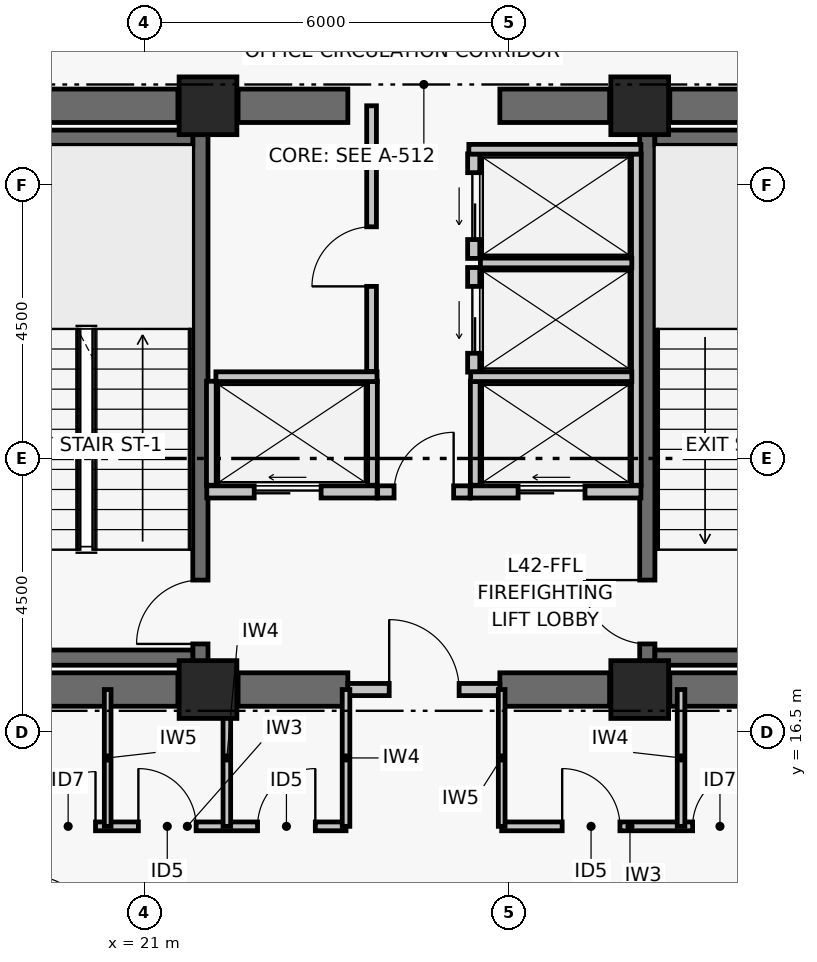
"""IFC4 building model, lengths in metres.
Left out: names, types, materials, properties, quantities, classifications, styles, units other than length and angle.
Written with IfcOpenShell. Run it as: python <this file> out.ifc"""

import sys

from ifc_helpers import new_model, si_unit, direction, frame, frame_2d, origin, origin_2d, place, context, subcontext, project, spatial, rectangle, extrude, element, fill, save


model = new_model("IFC4")
c1 = context("Model", 3, precision=1e-05, world=origin(), true_north=direction((0.0, 1.0)))
c2 = subcontext(c1, "Body", "Model", "MODEL_VIEW")
j1 = project(units=[si_unit("LENGTHUNIT", "METRE"), si_unit("PLANEANGLEUNIT", "RADIAN")], contexts=[c1])
p1 = place(None, origin())
s1 = spatial("IfcSite", under=j1, at=p1, CompositionType="ELEMENT")
p2 = place(p1, origin())
s2 = spatial("IfcBuilding", under=s1, at=p2, CompositionType="ELEMENT")
p3 = place(p2, frame((0.0, 0.0, 169.2)))
s3 = spatial("IfcBuildingStorey", under=s2, at=p3, CompositionType="ELEMENT", Elevation=169.2)
for number, where, z_axis, x_axis in (
    (1, (22.05, 17.2, 0.0), (0.0, 0.0, 1.0), (1.0, 0.0, 0.0)),
    (2, (29.15, 17.2, 0.0), (0.0, 0.0, 1.0), (1.0, 0.0, 0.0)),
    (3, (22.05, 26.8, 0.0), (0.0, 0.0, 1.0), (1.0, 0.0, 0.0)),
    (4, (29.15, 26.8, 0.0), (0.0, 0.0, 1.0), (1.0, 0.0, 0.0)),
):
    element("IfcColumn", number, at=place(p3, frame(where, z_axis=z_axis, x_axis=x_axis)), inside=s3, PredefinedType="COLUMN", context=c2, shape_type="SweptSolid", body=[
        extrude(rectangle(XDim=0.95, YDim=0.95, at=origin_2d()), origin(), (0.0, 0.0, 1.0), 3.72),
    ])
p4 = place(p3, frame((18.295, 17.2, 0.0), z_axis=(0.0, 0.0, 1.0), x_axis=(1.0, 0.0, 0.0)))
e5 = element("IfcWall", 5, at=p4, inside=s3, PredefinedType="SHEAR", context=c2, shape_type="SweptSolid", body=[
    extrude(rectangle(XDim=3.26, YDim=0.55, at=frame_2d((1.63, 0.0))), origin(), (0.0, 0.0, 1.0), 3.44),
])
p5 = place(p3, frame((22.545, 17.2, 0.0), z_axis=(0.0, 0.0, 1.0), x_axis=(1.0, 0.0, 0.0)))
e6 = element("IfcWall", 6, at=p5, inside=s3, PredefinedType="SHEAR", context=c2, shape_type="SweptSolid", body=[
    extrude(rectangle(XDim=1.805, YDim=0.55, at=frame_2d((0.903, 0.0))), origin(), (0.0, 0.0, 1.0), 3.44),
])
p6 = place(p3, frame((26.85, 17.2, 0.0), z_axis=(0.0, 0.0, 1.0), x_axis=(1.0, 0.0, 0.0)))
e7 = element("IfcWall", 7, at=p6, inside=s3, PredefinedType="SHEAR", context=c2, shape_type="SweptSolid", body=[
    extrude(rectangle(XDim=1.805, YDim=0.55, at=frame_2d((0.902, 0.0))), origin(), (0.0, 0.0, 1.0), 3.44),
])
for number, where, z_axis, x_axis in (
    (8, (29.645, 17.2, 0.0), (0.0, 0.0, 1.0), (1.0, 0.0, 0.0)),
    (9, (18.295, 26.8, 0.0), (0.0, 0.0, 1.0), (1.0, 0.0, 0.0)),
):
    element("IfcWall", number, at=place(p3, frame(where, z_axis=z_axis, x_axis=x_axis)), inside=s3, PredefinedType="SHEAR", context=c2, shape_type="SweptSolid", body=[
        extrude(rectangle(XDim=3.26, YDim=0.55, at=frame_2d((1.63, 0.0))), origin(), (0.0, 0.0, 1.0), 3.44),
    ])
p7 = place(p3, frame((22.545, 26.8, 0.0), z_axis=(0.0, 0.0, 1.0), x_axis=(1.0, 0.0, 0.0)))
e10 = element("IfcWall", 10, at=p7, inside=s3, PredefinedType="SHEAR", context=c2, shape_type="SweptSolid", body=[
    extrude(rectangle(XDim=1.805, YDim=0.55, at=frame_2d((0.903, 0.0))), origin(), (0.0, 0.0, 1.0), 3.44),
])
p8 = place(p3, frame((26.85, 26.8, 0.0), z_axis=(0.0, 0.0, 1.0), x_axis=(1.0, 0.0, 0.0)))
e11 = element("IfcWall", 11, at=p8, inside=s3, PredefinedType="SHEAR", context=c2, shape_type="SweptSolid", body=[
    extrude(rectangle(XDim=1.805, YDim=0.55, at=frame_2d((0.902, 0.0))), origin(), (0.0, 0.0, 1.0), 3.44),
])
p9 = place(p3, frame((29.645, 26.8, 0.0), z_axis=(0.0, 0.0, 1.0), x_axis=(1.0, 0.0, 0.0)))
e12 = element("IfcWall", 12, at=p9, inside=s3, PredefinedType="SHEAR", context=c2, shape_type="SweptSolid", body=[
    extrude(rectangle(XDim=3.26, YDim=0.55, at=frame_2d((1.63, 0.0))), origin(), (0.0, 0.0, 1.0), 3.44),
])
p10 = place(p3, frame((21.925, 17.6, 0.0), z_axis=(0.0, 0.0, 1.0), x_axis=(0.0, 1.0, 0.0)))
e13 = element("IfcWall", 13, at=p10, inside=s3, PredefinedType="SHEAR", context=c2, shape_type="SweptSolid", body=[
    extrude(rectangle(XDim=8.8, YDim=0.25, at=frame_2d((4.4, 0.0))), origin(), (0.0, 0.0, 1.0), 3.44),
])
p11 = place(p10, frame((0.35, 0.0, 0.0)))
e14 = element("IfcOpeningElement", 14, at=p11, cuts=e13, PredefinedType="OPENING", context=c2, shape_type="SweptSolid", body=[
    extrude(rectangle(XDim=1.05, YDim=2.08, at=frame_2d((0.525, 1.04))), frame((0.0, 0.135, 0.0), z_axis=(0.0, -1.0, 0.0), x_axis=(1.0, 0.0, 0.0)), (0.0, 0.0, 1.0), 0.27),
])
for number, where, z_axis, x_axis in (
    (15, (18.329, 17.725, 0.0), (0.0, 0.0, 1.0), (1.0, 0.0, 0.0)),
    (16, (18.329, 26.275, 0.0), (0.0, 0.0, 1.0), (1.0, 0.0, 0.0)),
):
    element("IfcWall", number, at=place(p3, frame(where, z_axis=z_axis, x_axis=x_axis)), inside=s3, PredefinedType="SHEAR", context=c2, shape_type="SweptSolid", body=[
        extrude(rectangle(XDim=3.471, YDim=0.25, at=frame_2d((1.735, 0.0))), origin(), (0.0, 0.0, 1.0), 3.44),
    ])
p12 = place(p3, frame((29.275, 17.6, 0.0), z_axis=(0.0, 0.0, 1.0), x_axis=(0.0, 1.0, 0.0)))
e17 = element("IfcWall", 17, at=p12, inside=s3, PredefinedType="SHEAR", context=c2, shape_type="SweptSolid", body=[
    extrude(rectangle(XDim=8.8, YDim=0.25, at=frame_2d((4.4, 0.0))), origin(), (0.0, 0.0, 1.0), 3.44),
])
p13 = place(p12, frame((0.35, 0.0, 0.0)))
e18 = element("IfcOpeningElement", 18, at=p13, cuts=e17, PredefinedType="OPENING", context=c2, shape_type="SweptSolid", body=[
    extrude(rectangle(XDim=1.05, YDim=2.08, at=frame_2d((0.525, 1.04))), frame((0.0, 0.135, 0.0), z_axis=(0.0, -1.0, 0.0), x_axis=(1.0, 0.0, 0.0)), (0.0, 0.0, 1.0), 0.27),
])
for number, where, z_axis, x_axis in (
    (19, (29.4, 17.725, 0.0), (0.0, 0.0, 1.0), (1.0, 0.0, 0.0)),
    (20, (29.4, 26.275, 0.0), (0.0, 0.0, 1.0), (1.0, 0.0, 0.0)),
):
    element("IfcWall", number, at=place(p3, frame(where, z_axis=z_axis, x_axis=x_axis)), inside=s3, PredefinedType="SHEAR", context=c2, shape_type="SweptSolid", body=[
        extrude(rectangle(XDim=3.471, YDim=0.25, at=frame_2d((1.736, 0.0))), origin(), (0.0, 0.0, 1.0), 3.44),
    ])
p14 = place(p3, frame((24.35, 17.2, 0.0), z_axis=(0.0, 0.0, 1.0), x_axis=(1.0, 0.0, 0.0)))
e21 = element("IfcWall", 21, at=p14, inside=s3, PredefinedType="PARTITIONING", context=c2, shape_type="SweptSolid", body=[
    extrude(rectangle(XDim=2.5, YDim=0.2, at=frame_2d((1.25, 0.0))), origin(), (0.0, 0.0, 1.0), 2.57),
])
p15 = place(p14, frame((0.68, 0.0, 0.0)))
e22 = element("IfcOpeningElement", 22, at=p15, cuts=e21, PredefinedType="OPENING", context=c2, shape_type="SweptSolid", body=[
    extrude(rectangle(XDim=1.15, YDim=2.08, at=frame_2d((0.575, 1.04))), frame((0.0, 0.11, 0.0), z_axis=(0.0, -1.0, 0.0), x_axis=(1.0, 0.0, 0.0)), (0.0, 0.0, 1.0), 0.22),
])
p16 = place(p3, frame((24.84, 20.45, 0.0), z_axis=(0.0, 0.0, 1.0), x_axis=(1.0, 0.0, 0.0)))
e23 = element("IfcWall", 23, at=p16, inside=s3, PredefinedType="PARTITIONING", context=c2, shape_type="SweptSolid", body=[
    extrude(rectangle(XDim=1.52, YDim=0.2, at=frame_2d((0.76, 0.0))), origin(), (0.0, 0.0, 1.0), 3.44),
])
p17 = place(p16, frame((0.27, 0.0, 0.0)))
e24 = element("IfcOpeningElement", 24, at=p17, cuts=e23, PredefinedType="OPENING", context=c2, shape_type="SweptSolid", body=[
    extrude(rectangle(XDim=0.98, YDim=2.06, at=frame_2d((0.49, 1.03))), frame((0.0, 0.11, 0.0), z_axis=(0.0, -1.0, 0.0), x_axis=(1.0, 0.0, 0.0)), (0.0, 0.0, 1.0), 0.22),
])
p18 = place(p3, frame((22.03, 20.45, 0.0), z_axis=(0.0, 0.0, 1.0), x_axis=(1.0, 0.0, 0.0)))
e25 = element("IfcWall", 25, at=p18, inside=s3, PredefinedType="PARTITIONING", context=c2, shape_type="SweptSolid", body=[
    extrude(rectangle(XDim=2.8, YDim=0.2, at=frame_2d((1.4, 0.0))), origin(), (0.0, 0.0, 1.0), 3.44),
])
p19 = place(p18, frame((0.78, 0.0, 0.0)))
e26 = element("IfcOpeningElement", 26, at=p19, cuts=e25, PredefinedType="OPENING", context=c2, shape_type="SweptSolid", body=[
    extrude(rectangle(XDim=1.1, YDim=2.08, at=frame_2d((0.55, 1.04))), frame((0.0, 0.11, 0.0), z_axis=(0.0, -1.0, 0.0), x_axis=(1.0, 0.0, 0.0)), (0.0, 0.0, 1.0), 0.22),
])
p20 = place(p3, frame((26.37, 20.45, 0.0), z_axis=(0.0, 0.0, 1.0), x_axis=(1.0, 0.0, 0.0)))
e27 = element("IfcWall", 27, at=p20, inside=s3, PredefinedType="PARTITIONING", context=c2, shape_type="SweptSolid", body=[
    extrude(rectangle(XDim=2.8, YDim=0.2, at=frame_2d((1.4, 0.0))), origin(), (0.0, 0.0, 1.0), 3.44),
])
p21 = place(p20, frame((0.78, 0.0, 0.0)))
e28 = element("IfcOpeningElement", 28, at=p21, cuts=e27, PredefinedType="OPENING", context=c2, shape_type="SweptSolid", body=[
    extrude(rectangle(XDim=1.1, YDim=2.08, at=frame_2d((0.55, 1.04))), frame((0.0, 0.11, 0.0), z_axis=(0.0, -1.0, 0.0), x_axis=(1.0, 0.0, 0.0)), (0.0, 0.0, 1.0), 0.22),
])
p22 = place(p3, frame((26.42, 22.42, 0.0), z_axis=(0.0, 0.0, 1.0), x_axis=(0.0, 1.0, 0.0)))
e29 = element("IfcWall", 29, at=p22, inside=s3, PredefinedType="PARTITIONING", context=c2, shape_type="SweptSolid", body=[
    extrude(rectangle(XDim=1.72, YDim=0.2, at=frame_2d((0.86, 0.0))), origin(), (0.0, 0.0, 1.0), 3.44),
])
p23 = place(p22, frame((0.31, 0.0, 0.0)))
e30 = element("IfcOpeningElement", 30, at=p23, cuts=e29, PredefinedType="OPENING", context=c2, shape_type="SweptSolid", body=[
    extrude(rectangle(XDim=1.1, YDim=2.08, at=frame_2d((0.55, 1.04))), frame((0.0, 0.11, 0.0), z_axis=(0.0, -1.0, 0.0), x_axis=(1.0, 0.0, 0.0)), (0.0, 0.0, 1.0), 0.22),
])
p24 = place(p3, frame((26.42, 24.29, 0.0), z_axis=(0.0, 0.0, 1.0), x_axis=(0.0, 1.0, 0.0)))
e31 = element("IfcWall", 31, at=p24, inside=s3, PredefinedType="PARTITIONING", context=c2, shape_type="SweptSolid", body=[
    extrude(rectangle(XDim=1.72, YDim=0.2, at=frame_2d((0.86, 0.0))), origin(), (0.0, 0.0, 1.0), 3.44),
])
p25 = place(p24, frame((0.31, 0.0, 0.0)))
e32 = element("IfcOpeningElement", 32, at=p25, cuts=e31, PredefinedType="OPENING", context=c2, shape_type="SweptSolid", body=[
    extrude(rectangle(XDim=1.1, YDim=2.08, at=frame_2d((0.55, 1.04))), frame((0.0, 0.11, 0.0), z_axis=(0.0, -1.0, 0.0), x_axis=(1.0, 0.0, 0.0)), (0.0, 0.0, 1.0), 0.22),
])
for number, where, z_axis, x_axis in (
    (33, (22.105, 20.56, 0.0), (0.0, 0.0, 1.0), (0.0, 1.0, 0.0)),
    (34, (24.755, 20.56, 0.0), (0.0, 0.0, 1.0), (0.0, 1.0, 0.0)),
):
    element("IfcWall", number, at=place(p3, frame(where, z_axis=z_axis, x_axis=x_axis)), inside=s3, PredefinedType="PARTITIONING", context=c2, shape_type="SweptSolid", body=[
        extrude(rectangle(XDim=1.71, YDim=0.16, at=frame_2d((0.855, 0.0))), origin(), (0.0, 0.0, 1.0), 3.44),
    ])
p26 = place(p3, frame((22.18, 22.345, 0.0), z_axis=(0.0, 0.0, 1.0), x_axis=(1.0, 0.0, 0.0)))
e35 = element("IfcWall", 35, at=p26, inside=s3, PredefinedType="PARTITIONING", context=c2, shape_type="SweptSolid", body=[
    extrude(rectangle(XDim=2.65, YDim=0.16, at=frame_2d((1.325, 0.0))), origin(), (0.0, 0.0, 1.0), 3.44),
])
p27 = place(p3, frame((29.095, 20.56, 0.0), z_axis=(0.0, 0.0, 1.0), x_axis=(0.0, 1.0, 0.0)))
e36 = element("IfcWall", 36, at=p27, inside=s3, PredefinedType="PARTITIONING", context=c2, shape_type="SweptSolid", body=[
    extrude(rectangle(XDim=5.45, YDim=0.16, at=frame_2d((2.725, 0.0))), origin(), (0.0, 0.0, 1.0), 3.44),
])
p28 = place(p3, frame((26.445, 20.56, 0.0), z_axis=(0.0, 0.0, 1.0), x_axis=(0.0, 1.0, 0.0)))
e37 = element("IfcWall", 37, at=p28, inside=s3, PredefinedType="PARTITIONING", context=c2, shape_type="SweptSolid", body=[
    extrude(rectangle(XDim=1.71, YDim=0.16, at=frame_2d((0.855, 0.0))), origin(), (0.0, 0.0, 1.0), 3.44),
])
p29 = place(p3, frame((26.37, 22.345, 0.0), z_axis=(0.0, 0.0, 1.0), x_axis=(1.0, 0.0, 0.0)))
e38 = element("IfcWall", 38, at=p29, inside=s3, PredefinedType="PARTITIONING", context=c2, shape_type="SweptSolid", body=[
    extrude(rectangle(XDim=2.65, YDim=0.16, at=frame_2d((1.325, 0.0))), origin(), (0.0, 0.0, 1.0), 3.44),
])
p30 = place(p3, frame((26.53, 24.215, 0.0), z_axis=(0.0, 0.0, 1.0), x_axis=(1.0, 0.0, 0.0)))
e39 = element("IfcWall", 39, at=p30, inside=s3, PredefinedType="PARTITIONING", context=c2, shape_type="SweptSolid", body=[
    extrude(rectangle(XDim=2.49, YDim=0.16, at=frame_2d((1.245, 0.0))), origin(), (0.0, 0.0, 1.0), 3.44),
])
p31 = place(p3, frame((26.34, 26.085, 0.0), z_axis=(0.0, 0.0, 1.0), x_axis=(1.0, 0.0, 0.0)))
e40 = element("IfcWall", 40, at=p31, inside=s3, PredefinedType="PARTITIONING", context=c2, shape_type="SweptSolid", body=[
    extrude(rectangle(XDim=2.83, YDim=0.16, at=frame_2d((1.415, 0.0))), origin(), (0.0, 0.0, 1.0), 3.44),
])
p32 = place(p3, frame((24.74, 22.43, 0.0), z_axis=(0.0, 0.0, 1.0), x_axis=(0.0, 1.0, 0.0)))
e41 = element("IfcWall", 41, at=p32, inside=s3, PredefinedType="PARTITIONING", context=c2, shape_type="SweptSolid", body=[
    extrude(rectangle(XDim=4.37, YDim=0.16, at=frame_2d((2.185, 0.0))), origin(), (0.0, 0.0, 1.0), 2.57),
])
p33 = place(p32, frame((1.4, 0.0, 0.0)))
e42 = element("IfcOpeningElement", 42, at=p33, cuts=e41, PredefinedType="OPENING", context=c2, shape_type="SweptSolid", body=[
    extrude(rectangle(XDim=0.98, YDim=2.06, at=frame_2d((0.49, 1.03))), frame((0.0, 0.09, 0.0), z_axis=(0.0, -1.0, 0.0), x_axis=(1.0, 0.0, 0.0)), (0.0, 0.0, 1.0), 0.18),
])
p34 = place(p3, frame((19.1, 14.95, 0.0), z_axis=(0.0, 0.0, 1.0), x_axis=(1.0, 0.0, 0.0)))
e43 = element("IfcWall", 43, at=p34, inside=s3, PredefinedType="PARTITIONING", context=c2, shape_type="SweptSolid", body=[
    extrude(rectangle(XDim=5.22, YDim=0.145, at=frame_2d((2.61, 0.0))), origin(), (0.0, 0.0, 1.0), 2.17),
])
p35 = place(p34, frame((0.2, 0.0, 0.0)))
e44 = element("IfcOpeningElement", 44, at=p35, cuts=e43, PredefinedType="OPENING", context=c2, shape_type="SweptSolid", body=[
    extrude(rectangle(XDim=0.9, YDim=2.02, at=frame_2d((0.45, 1.01))), frame((0.0, 0.083, 0.0), z_axis=(0.0, -1.0, 0.0), x_axis=(1.0, 0.0, 0.0)), (0.0, 0.0, 1.0), 0.165),
])
p36 = place(p34, frame((1.805, 0.0, 0.0)))
e45 = element("IfcOpeningElement", 45, at=p36, cuts=e43, PredefinedType="OPENING", context=c2, shape_type="SweptSolid", body=[
    extrude(rectangle(XDim=0.95, YDim=2.06, at=frame_2d((0.475, 1.03))), frame((0.0, 0.083, 0.0), z_axis=(0.0, -1.0, 0.0), x_axis=(1.0, 0.0, 0.0)), (0.0, 0.0, 1.0), 0.165),
])
p37 = place(p34, frame((3.765, 0.0, 0.0)))
e46 = element("IfcOpeningElement", 46, at=p37, cuts=e43, PredefinedType="OPENING", context=c2, shape_type="SweptSolid", body=[
    extrude(rectangle(XDim=0.95, YDim=2.06, at=frame_2d((0.475, 1.03))), frame((0.0, 0.083, 0.0), z_axis=(0.0, -1.0, 0.0), x_axis=(1.0, 0.0, 0.0)), (0.0, 0.0, 1.0), 0.165),
])
p38 = place(p3, frame((26.88, 14.95, 0.0), z_axis=(0.0, 0.0, 1.0), x_axis=(1.0, 0.0, 0.0)))
e47 = element("IfcWall", 47, at=p38, inside=s3, PredefinedType="PARTITIONING", context=c2, shape_type="SweptSolid", body=[
    extrude(rectangle(XDim=4.22, YDim=0.145, at=frame_2d((2.11, 0.0))), origin(), (0.0, 0.0, 1.0), 2.87),
])
p39 = place(p38, frame((0.995, 0.0, 0.0)))
e48 = element("IfcOpeningElement", 48, at=p39, cuts=e47, PredefinedType="OPENING", context=c2, shape_type="SweptSolid", body=[
    extrude(rectangle(XDim=0.95, YDim=2.06, at=frame_2d((0.475, 1.03))), frame((0.0, 0.083, 0.0), z_axis=(0.0, -1.0, 0.0), x_axis=(1.0, 0.0, 0.0)), (0.0, 0.0, 1.0), 0.165),
])
p40 = place(p38, frame((3.14, 0.0, 0.0)))
e49 = element("IfcOpeningElement", 49, at=p40, cuts=e47, PredefinedType="OPENING", context=c2, shape_type="SweptSolid", body=[
    extrude(rectangle(XDim=0.9, YDim=2.02, at=frame_2d((0.45, 1.01))), frame((0.0, 0.083, 0.0), z_axis=(0.0, -1.0, 0.0), x_axis=(1.0, 0.0, 0.0)), (0.0, 0.0, 1.0), 0.165),
])
p41 = place(p3, frame((20.4, 14.95, 0.0), z_axis=(0.0, 0.0, 1.0), x_axis=(0.0, 1.0, 0.0)))
e50 = element("IfcWall", 50, at=p41, inside=s3, PredefinedType="PARTITIONING", context=c2, shape_type="SweptSolid", body=[
    extrude(rectangle(XDim=2.25, YDim=0.11, at=frame_2d((1.125, 0.0))), origin(), (0.0, 0.0, 1.0), 2.57),
])
p42 = place(p3, frame((22.36, 14.95, 0.0), z_axis=(0.0, 0.0, 1.0), x_axis=(0.0, 1.0, 0.0)))
e51 = element("IfcWall", 51, at=p42, inside=s3, PredefinedType="PARTITIONING", context=c2, shape_type="SweptSolid", body=[
    extrude(rectangle(XDim=2.25, YDim=0.125, at=frame_2d((1.125, 0.0))), origin(), (0.0, 0.0, 1.0), 2.17),
])
p43 = place(p3, frame((24.32, 14.95, 0.0), z_axis=(0.0, 0.0, 1.0), x_axis=(0.0, 1.0, 0.0)))
e52 = element("IfcWall", 52, at=p43, inside=s3, PredefinedType="PARTITIONING", context=c2, shape_type="SweptSolid", body=[
    extrude(rectangle(XDim=2.25, YDim=0.125, at=frame_2d((1.125, 0.0))), origin(), (0.0, 0.0, 1.0), 2.57),
])
p44 = place(p3, frame((26.88, 14.95, 0.0), z_axis=(0.0, 0.0, 1.0), x_axis=(0.0, 1.0, 0.0)))
e53 = element("IfcWall", 53, at=p44, inside=s3, PredefinedType="PARTITIONING", context=c2, shape_type="SweptSolid", body=[
    extrude(rectangle(XDim=2.25, YDim=0.11, at=frame_2d((1.125, 0.0))), origin(), (0.0, 0.0, 1.0), 2.57),
])
p45 = place(p3, frame((29.83, 14.95, 0.0), z_axis=(0.0, 0.0, 1.0), x_axis=(0.0, 1.0, 0.0)))
e54 = element("IfcWall", 54, at=p45, inside=s3, PredefinedType="PARTITIONING", context=c2, shape_type="SweptSolid", body=[
    extrude(rectangle(XDim=2.25, YDim=0.125, at=frame_2d((1.125, 0.0))), origin(), (0.0, 0.0, 1.0), 2.57),
])
p46 = place(p11, origin())
e55 = element("IfcDoor", 55, at=p46, inside=s3, OperationType="SINGLE_SWING_LEFT", PredefinedType="DOOR", context=c2, shape_type="SweptSolid", body=[
    extrude(rectangle(XDim=1.05, YDim=2.08, at=frame_2d((0.525, 1.04))), frame((0.0, 0.025, 0.0), z_axis=(0.0, -1.0, 0.0), x_axis=(1.0, 0.0, 0.0)), (0.0, 0.0, 1.0), 0.05),
])
fill(e14, e55)
p47 = place(p13, origin())
e56 = element("IfcDoor", 56, at=p47, inside=s3, OperationType="SINGLE_SWING_RIGHT", PredefinedType="DOOR", context=c2, shape_type="SweptSolid", body=[
    extrude(rectangle(XDim=1.05, YDim=2.08, at=frame_2d((0.525, 1.04))), frame((0.0, 0.025, 0.0), z_axis=(0.0, -1.0, 0.0), x_axis=(1.0, 0.0, 0.0)), (0.0, 0.0, 1.0), 0.05),
])
fill(e18, e56)
p48 = place(p15, origin())
e57 = element("IfcDoor", 57, at=p48, inside=s3, OperationType="SINGLE_SWING_LEFT", PredefinedType="DOOR", context=c2, shape_type="SweptSolid", body=[
    extrude(rectangle(XDim=1.15, YDim=2.08, at=frame_2d((0.575, 1.04))), frame((0.0, 0.025, 0.0), z_axis=(0.0, -1.0, 0.0), x_axis=(1.0, 0.0, 0.0)), (0.0, 0.0, 1.0), 0.05),
])
fill(e22, e57)
p49 = place(p17, origin())
e58 = element("IfcDoor", 58, at=p49, inside=s3, OperationType="SINGLE_SWING_RIGHT", PredefinedType="DOOR", context=c2, shape_type="SweptSolid", body=[
    extrude(rectangle(XDim=0.98, YDim=2.06, at=frame_2d((0.49, 1.03))), frame((0.0, 0.025, 0.0), z_axis=(0.0, -1.0, 0.0), x_axis=(1.0, 0.0, 0.0)), (0.0, 0.0, 1.0), 0.05),
])
fill(e24, e58)
p50 = place(p19, origin())
e59 = element("IfcDoor", 59, at=p50, inside=s3, OperationType="DOUBLE_DOOR_SLIDING", PredefinedType="DOOR", context=c2, shape_type="SweptSolid", body=[
    extrude(rectangle(XDim=1.1, YDim=2.08, at=frame_2d((0.55, 1.04))), frame((0.0, 0.025, 0.0), z_axis=(0.0, -1.0, 0.0), x_axis=(1.0, 0.0, 0.0)), (0.0, 0.0, 1.0), 0.05),
])
fill(e26, e59)
p51 = place(p21, origin())
e60 = element("IfcDoor", 60, at=p51, inside=s3, OperationType="DOUBLE_DOOR_SLIDING", PredefinedType="DOOR", context=c2, shape_type="SweptSolid", body=[
    extrude(rectangle(XDim=1.1, YDim=2.08, at=frame_2d((0.55, 1.04))), frame((0.0, 0.025, 0.0), z_axis=(0.0, -1.0, 0.0), x_axis=(1.0, 0.0, 0.0)), (0.0, 0.0, 1.0), 0.05),
])
fill(e28, e60)
p52 = place(p23, origin())
e61 = element("IfcDoor", 61, at=p52, inside=s3, OperationType="DOUBLE_DOOR_SLIDING", PredefinedType="DOOR", context=c2, shape_type="SweptSolid", body=[
    extrude(rectangle(XDim=1.1, YDim=2.08, at=frame_2d((0.55, 1.04))), frame((0.0, 0.025, 0.0), z_axis=(0.0, -1.0, 0.0), x_axis=(1.0, 0.0, 0.0)), (0.0, 0.0, 1.0), 0.05),
])
fill(e30, e61)
p53 = place(p25, origin())
e62 = element("IfcDoor", 62, at=p53, inside=s3, OperationType="DOUBLE_DOOR_SLIDING", PredefinedType="DOOR", context=c2, shape_type="SweptSolid", body=[
    extrude(rectangle(XDim=1.1, YDim=2.08, at=frame_2d((0.55, 1.04))), frame((0.0, 0.025, 0.0), z_axis=(0.0, -1.0, 0.0), x_axis=(1.0, 0.0, 0.0)), (0.0, 0.0, 1.0), 0.05),
])
fill(e32, e62)
p54 = place(p33, origin())
e63 = element("IfcDoor", 63, at=p54, inside=s3, OperationType="SINGLE_SWING_LEFT", PredefinedType="DOOR", context=c2, shape_type="SweptSolid", body=[
    extrude(rectangle(XDim=0.98, YDim=2.06, at=frame_2d((0.49, 1.03))), frame((0.0, 0.025, 0.0), z_axis=(0.0, -1.0, 0.0), x_axis=(1.0, 0.0, 0.0)), (0.0, 0.0, 1.0), 0.05),
])
fill(e42, e63)
p55 = place(p35, origin())
e64 = element("IfcDoor", 64, at=p55, inside=s3, OperationType="SINGLE_SWING_RIGHT", PredefinedType="DOOR", context=c2, shape_type="SweptSolid", body=[
    extrude(rectangle(XDim=0.9, YDim=2.02, at=frame_2d((0.45, 1.01))), frame((0.0, 0.025, 0.0), z_axis=(0.0, -1.0, 0.0), x_axis=(1.0, 0.0, 0.0)), (0.0, 0.0, 1.0), 0.05),
])
fill(e44, e64)
p56 = place(p36, origin())
e65 = element("IfcDoor", 65, at=p56, inside=s3, OperationType="SINGLE_SWING_LEFT", PredefinedType="DOOR", context=c2, shape_type="SweptSolid", body=[
    extrude(rectangle(XDim=0.95, YDim=2.06, at=frame_2d((0.475, 1.03))), frame((0.0, 0.025, 0.0), z_axis=(0.0, -1.0, 0.0), x_axis=(1.0, 0.0, 0.0)), (0.0, 0.0, 1.0), 0.05),
])
fill(e45, e65)
p57 = place(p37, origin())
e66 = element("IfcDoor", 66, at=p57, inside=s3, OperationType="SINGLE_SWING_RIGHT", PredefinedType="DOOR", context=c2, shape_type="SweptSolid", body=[
    extrude(rectangle(XDim=0.95, YDim=2.06, at=frame_2d((0.475, 1.03))), frame((0.0, 0.025, 0.0), z_axis=(0.0, -1.0, 0.0), x_axis=(1.0, 0.0, 0.0)), (0.0, 0.0, 1.0), 0.05),
])
fill(e46, e66)
p58 = place(p39, origin())
e67 = element("IfcDoor", 67, at=p58, inside=s3, OperationType="SINGLE_SWING_LEFT", PredefinedType="DOOR", context=c2, shape_type="SweptSolid", body=[
    extrude(rectangle(XDim=0.95, YDim=2.06, at=frame_2d((0.475, 1.03))), frame((0.0, 0.025, 0.0), z_axis=(0.0, -1.0, 0.0), x_axis=(1.0, 0.0, 0.0)), (0.0, 0.0, 1.0), 0.05),
])
fill(e48, e67)
p59 = place(p40, origin())
e68 = element("IfcDoor", 68, at=p59, inside=s3, OperationType="SINGLE_SWING_RIGHT", PredefinedType="DOOR", context=c2, shape_type="SweptSolid", body=[
    extrude(rectangle(XDim=0.9, YDim=2.02, at=frame_2d((0.45, 1.01))), frame((0.0, 0.025, 0.0), z_axis=(0.0, -1.0, 0.0), x_axis=(1.0, 0.0, 0.0)), (0.0, 0.0, 1.0), 0.05),
])
fill(e49, e68)
save(model, sys.argv[1])
